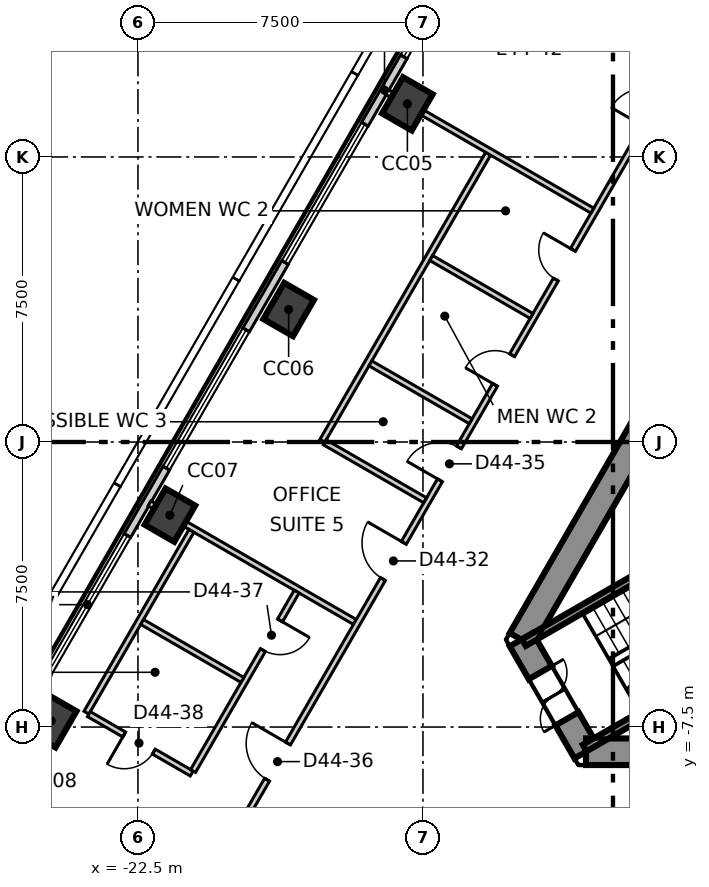
"""IFC4 building model, lengths in metres.
Left out: names, types, materials, properties, quantities, classifications, styles, units other than length and angle.
Written with IfcOpenShell. Run it as: python <this file> out.ifc"""

import sys

from ifc_helpers import new_model, si_unit, direction, frame, frame_2d, origin, origin_2d, place, context, subcontext, project, spatial, polyline, rectangle, outline, extrude, element, fill, save


model = new_model("IFC4")
c1 = context("Model", 3, precision=1e-05, world=origin(), true_north=direction((0.0, 1.0)))
c2 = subcontext(c1, "Body", "Model", "MODEL_VIEW")
j1 = project(units=[si_unit("LENGTHUNIT", "METRE"), si_unit("PLANEANGLEUNIT", "RADIAN")], contexts=[c1])
p1 = place(None, origin())
s1 = spatial("IfcSite", under=j1, at=p1, CompositionType="ELEMENT")
p2 = place(p1, origin())
s2 = spatial("IfcBuilding", under=s1, at=p2, CompositionType="ELEMENT")
p3 = place(p2, frame((0.0, 0.0, 191.3)))
s3 = spatial("IfcBuildingStorey", under=s2, at=p3, CompositionType="ELEMENT", Elevation=191.3)
p4 = place(p3, frame((-1.703, 13.35, -0.3), z_axis=(0.0, 0.0, 1.0), x_axis=(-0.500011533395, -0.866018744874, 0.0)))
e1 = element("IfcWall", 1, at=p4, inside=s3, PredefinedType="SHEAR", context=c2, shape_type="SweptSolid", body=[
    extrude(outline(polyline([(-0.202, -0.35), (1.782, -0.35), (3.766, -0.35), (5.75, -0.35), (7.734, -0.35), (9.718, -0.35), (11.702, -0.35), (13.686, -0.35), (15.67, -0.35), (17.654, -0.35), (19.638, -0.35), (21.622, -0.35), (21.218, 0.35), (19.307, 0.35), (17.397, 0.35), (15.486, 0.35), (13.576, 0.35), (11.665, 0.35), (9.755, 0.35), (7.844, 0.35), (5.934, 0.35), (4.023, 0.35), (2.113, 0.35), (0.202, 0.35), (-0.202, -0.35)])), origin(), (0.0, 0.0, 1.0), 4.0),
])
p5 = place(p4, frame((10.16, 0.0, 0.3)))
e2 = element("IfcOpeningElement", 2, at=p5, cuts=e1, PredefinedType="OPENING", context=c2, shape_type="SweptSolid", body=[
    extrude(rectangle(XDim=1.1, YDim=2.1, at=frame_2d((0.55, 1.05))), frame((0.0, 0.36, 0.0), z_axis=(0.0, -1.0, 0.0), x_axis=(1.0, 0.0, 0.0)), (0.0, 0.0, 1.0), 0.72),
])
p6 = place(p3, frame((-12.413, -5.2, -0.3), z_axis=(0.0, 0.0, 1.0), x_axis=(0.49999337185, -0.866029230515, 0.0)))
e3 = element("IfcWall", 3, at=p6, inside=s3, PredefinedType="SHEAR", context=c2, shape_type="SweptSolid", body=[
    extrude(outline(polyline([(-0.202, -0.35), (1.703, -0.35), (3.608, -0.35), (3.204, 0.35), (1.703, 0.35), (0.202, 0.35), (-0.202, -0.35)])), origin(), (0.0, 0.0, 1.0), 4.0),
])
p7 = place(p6, frame((1.003, 0.0, 0.3)))
e4 = element("IfcOpeningElement", 4, at=p7, cuts=e3, PredefinedType="OPENING", context=c2, shape_type="SweptSolid", body=[
    extrude(rectangle(XDim=1.4, YDim=2.1, at=frame_2d((0.7, 1.05))), frame((0.0, 0.36, 0.0), z_axis=(0.0, -1.0, 0.0), x_axis=(1.0, 0.0, 0.0)), (0.0, 0.0, 1.0), 0.72),
])
p8 = place(p3, frame((-10.71, -8.15, -0.3), z_axis=(0.0, 0.0, 1.0), x_axis=(1.0, 0.0, 0.0)))
e5 = element("IfcWall", 5, at=p8, inside=s3, PredefinedType="SHEAR", context=c2, shape_type="SweptSolid", body=[
    extrude(outline(polyline([(-0.202, -0.35), (1.782, -0.35), (3.766, -0.35), (5.75, -0.35), (7.734, -0.35), (9.718, -0.35), (11.702, -0.35), (13.686, -0.35), (15.67, -0.35), (17.654, -0.35), (19.638, -0.35), (21.622, -0.35), (21.218, 0.35), (19.307, 0.35), (17.397, 0.35), (15.486, 0.35), (13.576, 0.35), (11.665, 0.35), (9.755, 0.35), (7.844, 0.35), (5.934, 0.35), (4.023, 0.35), (2.113, 0.35), (0.202, 0.35), (-0.202, -0.35)])), origin(), (0.0, 0.0, 1.0), 4.0),
])
p9 = place(p8, frame((9.81, 0.0, 0.3)))
e6 = element("IfcOpeningElement", 6, at=p9, cuts=e5, PredefinedType="OPENING", context=c2, shape_type="SweptSolid", body=[
    extrude(rectangle(XDim=1.8, YDim=2.1, at=frame_2d((0.9, 1.05))), frame((0.0, 0.36, 0.0), z_axis=(0.0, -1.0, 0.0), x_axis=(1.0, 0.0, 0.0)), (0.0, 0.0, 1.0), 0.72),
])
p10 = place(p8, frame((4.09, 0.0, 0.3)))
e7 = element("IfcOpeningElement", 7, at=p10, cuts=e5, PredefinedType="OPENING", context=c2, shape_type="SweptSolid", body=[
    extrude(rectangle(XDim=1.0, YDim=2.1, at=frame_2d((0.5, 1.05))), frame((0.0, 0.36, 0.0), z_axis=(0.0, -1.0, 0.0), x_axis=(1.0, 0.0, 0.0)), (0.0, 0.0, 1.0), 0.72),
])
for number, where, z_axis, x_axis in (
    (8, (-15.41, 8.898, -0.3), (0.0, 0.0, 1.0), (0.5, 0.866, 0.0)),
    (9, (-18.535, 3.486, -0.3), (0.0, 0.0, 1.0), (0.5, 0.866, 0.0)),
    (10, (-21.659, -1.925, -0.3), (0.0, 0.0, 1.0), (0.5, 0.866, 0.0)),
    (11, (-24.783, -7.336, -0.3), (0.0, 0.0, 1.0), (0.5, 0.866, 0.0)),
):
    element("IfcColumn", number, at=place(p3, frame(where, z_axis=z_axis, x_axis=x_axis)), inside=s3, PredefinedType="COLUMN", context=c2, shape_type="SweptSolid", body=[
        extrude(rectangle(XDim=1.1, YDim=0.9, at=origin_2d()), origin(), (0.0, 0.0, 1.0), 4.0),
    ])
p11 = place(p3, frame((-2.869, 32.02, 0.0), z_axis=(0.0, 0.0, 1.0), x_axis=(-0.500006930241, -0.866021402571, 0.0)))
e12 = element("IfcWall", 12, at=p11, inside=s3, PredefinedType="ELEMENTEDWALL", context=c2, shape_type="SweptSolid", body=[
    extrude(rectangle(XDim=52.572, YDim=0.2, at=frame_2d((26.286, 0.0))), origin(), (0.0, 0.0, 1.0), 3.7),
])
p12 = place(p11, frame((2.327, 0.0, 0.9)))
e13 = element("IfcOpeningElement", 13, at=p12, cuts=e12, PredefinedType="OPENING", context=c2, shape_type="SweptSolid", body=[
    extrude(rectangle(XDim=4.2, YDim=2.5, at=frame_2d((2.1, 1.25))), frame((0.0, 0.11, 0.0), z_axis=(0.0, -1.0, 0.0), x_axis=(1.0, 0.0, 0.0)), (0.0, 0.0, 1.0), 0.22),
])
p13 = place(p11, frame((8.575, 0.0, 0.9)))
e14 = element("IfcOpeningElement", 14, at=p13, cuts=e12, PredefinedType="OPENING", context=c2, shape_type="SweptSolid", body=[
    extrude(rectangle(XDim=4.2, YDim=2.5, at=frame_2d((2.1, 1.25))), frame((0.0, 0.11, 0.0), z_axis=(0.0, -1.0, 0.0), x_axis=(1.0, 0.0, 0.0)), (0.0, 0.0, 1.0), 0.22),
])
p14 = place(p11, frame((14.823, 0.0, 0.9)))
e15 = element("IfcOpeningElement", 15, at=p14, cuts=e12, PredefinedType="OPENING", context=c2, shape_type="SweptSolid", body=[
    extrude(rectangle(XDim=4.2, YDim=2.5, at=frame_2d((2.1, 1.25))), frame((0.0, 0.11, 0.0), z_axis=(0.0, -1.0, 0.0), x_axis=(1.0, 0.0, 0.0)), (0.0, 0.0, 1.0), 0.22),
])
p15 = place(p11, frame((21.071, 0.0, 0.9)))
e16 = element("IfcOpeningElement", 16, at=p15, cuts=e12, PredefinedType="OPENING", context=c2, shape_type="SweptSolid", body=[
    extrude(rectangle(XDim=4.2, YDim=2.5, at=frame_2d((2.1, 1.25))), frame((0.0, 0.11, 0.0), z_axis=(0.0, -1.0, 0.0), x_axis=(1.0, 0.0, 0.0)), (0.0, 0.0, 1.0), 0.22),
])
p16 = place(p11, frame((27.319, 0.0, 0.9)))
e17 = element("IfcOpeningElement", 17, at=p16, cuts=e12, PredefinedType="OPENING", context=c2, shape_type="SweptSolid", body=[
    extrude(rectangle(XDim=4.2, YDim=2.5, at=frame_2d((2.1, 1.25))), frame((0.0, 0.11, 0.0), z_axis=(0.0, -1.0, 0.0), x_axis=(1.0, 0.0, 0.0)), (0.0, 0.0, 1.0), 0.22),
])
p17 = place(p11, frame((33.568, 0.0, 0.9)))
e18 = element("IfcOpeningElement", 18, at=p17, cuts=e12, PredefinedType="OPENING", context=c2, shape_type="SweptSolid", body=[
    extrude(rectangle(XDim=4.2, YDim=2.5, at=frame_2d((2.1, 1.25))), frame((0.0, 0.11, 0.0), z_axis=(0.0, -1.0, 0.0), x_axis=(1.0, 0.0, 0.0)), (0.0, 0.0, 1.0), 0.22),
])
p18 = place(p11, frame((39.816, 0.0, 0.9)))
e19 = element("IfcOpeningElement", 19, at=p18, cuts=e12, PredefinedType="OPENING", context=c2, shape_type="SweptSolid", body=[
    extrude(rectangle(XDim=4.2, YDim=2.5, at=frame_2d((2.1, 1.25))), frame((0.0, 0.11, 0.0), z_axis=(0.0, -1.0, 0.0), x_axis=(1.0, 0.0, 0.0)), (0.0, 0.0, 1.0), 0.22),
])
p19 = place(p11, frame((46.064, 0.0, 0.9)))
e20 = element("IfcOpeningElement", 20, at=p19, cuts=e12, PredefinedType="OPENING", context=c2, shape_type="SweptSolid", body=[
    extrude(rectangle(XDim=4.2, YDim=2.5, at=frame_2d((2.1, 1.25))), frame((0.0, 0.11, 0.0), z_axis=(0.0, -1.0, 0.0), x_axis=(1.0, 0.0, 0.0)), (0.0, 0.0, 1.0), 0.22),
])
p20 = place(p3, frame((-22.196, -1.615, 0.0), z_axis=(0.0, 0.0, 1.0), x_axis=(0.86601944389, -0.500010322698, 0.0)))
e21 = element("IfcWall", 21, at=p20, inside=s3, PredefinedType="PARTITIONING", context=c2, shape_type="SweptSolid", body=[
    extrude(rectangle(XDim=6.24, YDim=0.15, at=frame_2d((3.12, 0.0))), origin(), (0.0, 0.0, 1.0), 3.7),
])
p21 = place(p3, frame((-20.882, -11.969, 0.0), z_axis=(0.0, 0.0, 1.0), x_axis=(0.499998738735, 0.866026131975, 0.0)))
e22 = element("IfcWall", 22, at=p21, inside=s3, PredefinedType="PARTITIONING", context=c2, shape_type="SweptSolid", body=[
    extrude(rectangle(XDim=41.764, YDim=0.15, at=frame_2d((20.882, 0.0))), origin(), (0.0, 0.0, 1.0), 3.7),
])
p22 = place(p21, frame((37.014, 0.0, 0.0)))
e23 = element("IfcOpeningElement", 23, at=p22, cuts=e22, PredefinedType="OPENING", context=c2, shape_type="SweptSolid", body=[
    extrude(rectangle(XDim=1.0, YDim=2.1, at=frame_2d((0.5, 1.05))), frame((0.0, 0.085, 0.0), z_axis=(0.0, -1.0, 0.0), x_axis=(1.0, 0.0, 0.0)), (0.0, 0.0, 1.0), 0.17),
])
p23 = place(p21, frame((29.653, 0.0, 0.0)))
e24 = element("IfcOpeningElement", 24, at=p23, cuts=e22, PredefinedType="OPENING", context=c2, shape_type="SweptSolid", body=[
    extrude(rectangle(XDim=1.0, YDim=2.1, at=frame_2d((0.5, 1.05))), frame((0.0, 0.085, 0.0), z_axis=(0.0, -1.0, 0.0), x_axis=(1.0, 0.0, 0.0)), (0.0, 0.0, 1.0), 0.17),
])
p24 = place(p21, frame((23.405, 0.0, 0.0)))
e25 = element("IfcOpeningElement", 25, at=p24, cuts=e22, PredefinedType="OPENING", context=c2, shape_type="SweptSolid", body=[
    extrude(rectangle(XDim=1.0, YDim=2.1, at=frame_2d((0.5, 1.05))), frame((0.0, 0.085, 0.0), z_axis=(0.0, -1.0, 0.0), x_axis=(1.0, 0.0, 0.0)), (0.0, 0.0, 1.0), 0.17),
])
p25 = place(p21, frame((9.657, 0.0, 0.0)))
e26 = element("IfcOpeningElement", 26, at=p25, cuts=e22, PredefinedType="OPENING", context=c2, shape_type="SweptSolid", body=[
    extrude(rectangle(XDim=1.1, YDim=2.1, at=frame_2d((0.55, 1.05))), frame((0.0, 0.085, 0.0), z_axis=(0.0, -1.0, 0.0), x_axis=(1.0, 0.0, 0.0)), (0.0, 0.0, 1.0), 0.17),
])
p26 = place(p21, frame((18.757, 0.0, 0.0)))
e27 = element("IfcOpeningElement", 27, at=p26, cuts=e22, PredefinedType="OPENING", context=c2, shape_type="SweptSolid", body=[
    extrude(rectangle(XDim=0.9, YDim=2.1, at=frame_2d((0.45, 1.05))), frame((0.0, 0.085, 0.0), z_axis=(0.0, -1.0, 0.0), x_axis=(1.0, 0.0, 0.0)), (0.0, 0.0, 1.0), 0.17),
])
p27 = place(p21, frame((15.557, 0.0, 0.0)))
e28 = element("IfcOpeningElement", 28, at=p27, cuts=e22, PredefinedType="OPENING", context=c2, shape_type="SweptSolid", body=[
    extrude(rectangle(XDim=0.9, YDim=2.1, at=frame_2d((0.45, 1.05))), frame((0.0, 0.085, 0.0), z_axis=(0.0, -1.0, 0.0), x_axis=(1.0, 0.0, 0.0)), (0.0, 0.0, 1.0), 0.17),
])
p28 = place(p21, frame((12.657, 0.0, 0.0)))
e29 = element("IfcOpeningElement", 29, at=p28, cuts=e22, PredefinedType="OPENING", context=c2, shape_type="SweptSolid", body=[
    extrude(rectangle(XDim=1.0, YDim=2.1, at=frame_2d((0.5, 1.05))), frame((0.0, 0.085, 0.0), z_axis=(0.0, -1.0, 0.0), x_axis=(1.0, 0.0, 0.0)), (0.0, 0.0, 1.0), 0.17),
])
p29 = place(p21, frame((3.56, 0.0, 0.0)))
e30 = element("IfcOpeningElement", 30, at=p29, cuts=e22, PredefinedType="OPENING", context=c2, shape_type="SweptSolid", body=[
    extrude(rectangle(XDim=1.1, YDim=2.1, at=frame_2d((0.55, 1.05))), frame((0.0, 0.085, 0.0), z_axis=(0.0, -1.0, 0.0), x_axis=(1.0, 0.0, 0.0)), (0.0, 0.0, 1.0), 0.17),
])
p30 = place(p3, frame((-17.648, 0.029, 0.0), z_axis=(0.0, 0.0, 1.0), x_axis=(0.500054279689, 0.865994063124, 0.0)))
e31 = element("IfcWall", 31, at=p30, inside=s3, PredefinedType="PARTITIONING", context=c2, shape_type="SweptSolid", body=[
    extrude(rectangle(XDim=8.725, YDim=0.15, at=frame_2d((4.363, 0.0))), origin(), (0.0, 0.0, 1.0), 3.7),
])
for number, where, z_axis, x_axis in (
    (32, (-17.583, -0.009, 0.0), (0.0, 0.0, 1.0), (0.866, -0.5, 0.0)),
    (33, (-16.383, 2.069, 0.0), (0.0, 0.0, 1.0), (0.866, -0.5, 0.0)),
):
    element("IfcWall", number, at=place(p3, frame(where, z_axis=z_axis, x_axis=x_axis)), inside=s3, PredefinedType="PARTITIONING", context=c2, shape_type="SweptSolid", body=[
        extrude(rectangle(XDim=3.048, YDim=0.15, at=frame_2d((1.524, 0.0))), origin(), (0.0, 0.0, 1.0), 3.7),
    ])
p31 = place(p3, frame((-15.947, 9.208, 0.0), z_axis=(0.0, 0.0, 1.0), x_axis=(0.86601944389, -0.500010322698, 0.0)))
e34 = element("IfcWall", 34, at=p31, inside=s3, PredefinedType="PARTITIONING", context=c2, shape_type="SweptSolid", body=[
    extrude(rectangle(XDim=6.24, YDim=0.15, at=frame_2d((3.12, 0.0))), origin(), (0.0, 0.0, 1.0), 3.2),
])
p32 = place(p3, frame((-14.783, 4.841, 0.0), z_axis=(0.0, 0.0, 1.0), x_axis=(0.866021535541, -0.500006699934, 0.0)))
e35 = element("IfcWall", 35, at=p32, inside=s3, PredefinedType="PARTITIONING", context=c2, shape_type="SweptSolid", body=[
    extrude(rectangle(XDim=3.048, YDim=0.15, at=frame_2d((1.524, 0.0))), origin(), (0.0, 0.0, 1.0), 3.7),
])
p33 = place(p3, frame((-23.855, -7.123, 0.0), z_axis=(0.0, 0.0, 1.0), x_axis=(0.499994082372, 0.866028820302, 0.0)))
e36 = element("IfcWall", 36, at=p33, inside=s3, PredefinedType="PARTITIONING", context=c2, shape_type="SweptSolid", body=[
    extrude(rectangle(XDim=5.524, YDim=0.15, at=frame_2d((2.762, 0.0))), origin(), (0.0, 0.0, 1.0), 3.7),
])
p34 = place(p3, frame((-23.79, -7.161, 0.0), z_axis=(0.0, 0.0, 1.0), x_axis=(0.866050172578, -0.499957096737, 0.0)))
e37 = element("IfcWall", 37, at=p34, inside=s3, PredefinedType="PARTITIONING", context=c2, shape_type="SweptSolid", body=[
    extrude(rectangle(XDim=3.122, YDim=0.15, at=frame_2d((1.561, 0.0))), origin(), (0.0, 0.0, 1.0), 3.7),
])
p35 = place(p34, frame((1.072, 0.0, 0.0)))
e38 = element("IfcOpeningElement", 38, at=p35, cuts=e37, PredefinedType="OPENING", context=c2, shape_type="SweptSolid", body=[
    extrude(rectangle(XDim=0.9, YDim=2.1, at=frame_2d((0.45, 1.05))), frame((0.0, 0.085, 0.0), z_axis=(0.0, -1.0, 0.0), x_axis=(1.0, 0.0, 0.0)), (0.0, 0.0, 1.0), 0.17),
])
p36 = place(p3, frame((-21.049, -8.657, 0.0), z_axis=(0.0, 0.0, 1.0), x_axis=(0.500002931134, 0.866023711487, 0.0)))
e39 = element("IfcWall", 39, at=p36, inside=s3, PredefinedType="PARTITIONING", context=c2, shape_type="SweptSolid", body=[
    extrude(rectangle(XDim=5.45, YDim=0.15, at=frame_2d((2.725, 0.0))), origin(), (0.0, 0.0, 1.0), 3.7),
])
p37 = place(p36, frame((3.675, 0.0, 0.0)))
e40 = element("IfcOpeningElement", 40, at=p37, cuts=e39, PredefinedType="OPENING", context=c2, shape_type="SweptSolid", body=[
    extrude(rectangle(XDim=0.9, YDim=2.1, at=frame_2d((0.45, 1.05))), frame((0.0, 0.085, 0.0), z_axis=(0.0, -1.0, 0.0), x_axis=(1.0, 0.0, 0.0)), (0.0, 0.0, 1.0), 0.17),
])
p38 = place(p3, frame((-22.39, -4.736, 0.0), z_axis=(0.0, 0.0, 1.0), x_axis=(0.865976105257, -0.500085377835, 0.0)))
e41 = element("IfcWall", 41, at=p38, inside=s3, PredefinedType="PARTITIONING", context=c2, shape_type="SweptSolid", body=[
    extrude(rectangle(XDim=3.047, YDim=0.15, at=frame_2d((1.524, 0.0))), origin(), (0.0, 0.0, 1.0), 3.7),
])
p39 = place(p3, frame((-12.344, -5.279, 0.0), z_axis=(0.0, 0.0, 1.0), x_axis=(0.866046323291, 0.499963764601, 0.0)))
e42 = element("IfcWall", 42, at=p39, inside=s3, PredefinedType="SOLIDWALL", context=c2, shape_type="SweptSolid", body=[
    extrude(rectangle(XDim=6.714, YDim=0.2, at=frame_2d((3.357, 0.0))), origin(), (0.0, 0.0, 1.0), 3.7),
])
p40 = place(p3, frame((-10.744, -8.051, 0.0), z_axis=(0.0, 0.0, 1.0), x_axis=(0.865983344943, 0.500072840975, 0.0)))
e43 = element("IfcWall", 43, at=p40, inside=s3, PredefinedType="SOLIDWALL", context=c2, shape_type="SweptSolid", body=[
    extrude(rectangle(XDim=6.715, YDim=0.2, at=frame_2d((3.357, 0.0))), origin(), (0.0, 0.0, 1.0), 3.7),
])
p41 = place(p15, origin())
e44 = element("IfcWindow", 44, at=p41, inside=s3, PartitioningType="SINGLE_PANEL", PredefinedType="WINDOW", context=c2, shape_type="SweptSolid", body=[
    extrude(rectangle(XDim=4.2, YDim=2.5, at=frame_2d((2.1, 1.25))), frame((0.0, 0.03, 0.0), z_axis=(0.0, -1.0, 0.0), x_axis=(1.0, 0.0, 0.0)), (0.0, 0.0, 1.0), 0.06),
])
fill(e16, e44)
p42 = place(p16, origin())
e45 = element("IfcWindow", 45, at=p42, inside=s3, PartitioningType="SINGLE_PANEL", PredefinedType="WINDOW", context=c2, shape_type="SweptSolid", body=[
    extrude(rectangle(XDim=4.2, YDim=2.5, at=frame_2d((2.1, 1.25))), frame((0.0, 0.03, 0.0), z_axis=(0.0, -1.0, 0.0), x_axis=(1.0, 0.0, 0.0)), (0.0, 0.0, 1.0), 0.06),
])
fill(e17, e45)
p43 = place(p17, origin())
e46 = element("IfcWindow", 46, at=p43, inside=s3, PartitioningType="SINGLE_PANEL", PredefinedType="WINDOW", context=c2, shape_type="SweptSolid", body=[
    extrude(rectangle(XDim=4.2, YDim=2.5, at=frame_2d((2.1, 1.25))), frame((0.0, 0.03, 0.0), z_axis=(0.0, -1.0, 0.0), x_axis=(1.0, 0.0, 0.0)), (0.0, 0.0, 1.0), 0.06),
])
fill(e18, e46)
p44 = place(p18, origin())
e47 = element("IfcWindow", 47, at=p44, inside=s3, PartitioningType="SINGLE_PANEL", PredefinedType="WINDOW", context=c2, shape_type="SweptSolid", body=[
    extrude(rectangle(XDim=4.2, YDim=2.5, at=frame_2d((2.1, 1.25))), frame((0.0, 0.03, 0.0), z_axis=(0.0, -1.0, 0.0), x_axis=(1.0, 0.0, 0.0)), (0.0, 0.0, 1.0), 0.06),
])
fill(e19, e47)
p45 = place(p25, origin())
e48 = element("IfcDoor", 48, at=p45, inside=s3, OperationType="SINGLE_SWING_LEFT", PredefinedType="DOOR", context=c2, shape_type="SweptSolid", body=[
    extrude(rectangle(XDim=1.1, YDim=2.1, at=frame_2d((0.55, 1.05))), frame((0.0, 0.025, 0.0), z_axis=(0.0, -1.0, 0.0), x_axis=(1.0, 0.0, 0.0)), (0.0, 0.0, 1.0), 0.05),
])
fill(e26, e48)
p46 = place(p26, origin())
e49 = element("IfcDoor", 49, at=p46, inside=s3, OperationType="SINGLE_SWING_LEFT", PredefinedType="DOOR", context=c2, shape_type="SweptSolid", body=[
    extrude(rectangle(XDim=0.9, YDim=2.1, at=frame_2d((0.45, 1.05))), frame((0.0, 0.025, 0.0), z_axis=(0.0, -1.0, 0.0), x_axis=(1.0, 0.0, 0.0)), (0.0, 0.0, 1.0), 0.05),
])
fill(e27, e49)
p47 = place(p27, origin())
e50 = element("IfcDoor", 50, at=p47, inside=s3, OperationType="SINGLE_SWING_RIGHT", PredefinedType="DOOR", context=c2, shape_type="SweptSolid", body=[
    extrude(rectangle(XDim=0.9, YDim=2.1, at=frame_2d((0.45, 1.05))), frame((0.0, 0.025, 0.0), z_axis=(0.0, -1.0, 0.0), x_axis=(1.0, 0.0, 0.0)), (0.0, 0.0, 1.0), 0.05),
])
fill(e28, e50)
p48 = place(p28, origin())
e51 = element("IfcDoor", 51, at=p48, inside=s3, OperationType="SINGLE_SWING_RIGHT", PredefinedType="DOOR", context=c2, shape_type="SweptSolid", body=[
    extrude(rectangle(XDim=1.0, YDim=2.1, at=frame_2d((0.5, 1.05))), frame((0.0, 0.025, 0.0), z_axis=(0.0, -1.0, 0.0), x_axis=(1.0, 0.0, 0.0)), (0.0, 0.0, 1.0), 0.05),
])
fill(e29, e51)
p49 = place(p29, origin())
e52 = element("IfcDoor", 52, at=p49, inside=s3, OperationType="SINGLE_SWING_LEFT", PredefinedType="DOOR", context=c2, shape_type="SweptSolid", body=[
    extrude(rectangle(XDim=1.1, YDim=2.1, at=frame_2d((0.55, 1.05))), frame((0.0, 0.025, 0.0), z_axis=(0.0, -1.0, 0.0), x_axis=(1.0, 0.0, 0.0)), (0.0, 0.0, 1.0), 0.05),
])
fill(e30, e52)
p50 = place(p37, origin())
e53 = element("IfcDoor", 53, at=p50, inside=s3, OperationType="SINGLE_SWING_RIGHT", PredefinedType="DOOR", context=c2, shape_type="SweptSolid", body=[
    extrude(rectangle(XDim=0.9, YDim=2.1, at=frame_2d((0.45, 1.05))), frame((0.0, 0.025, 0.0), z_axis=(0.0, -1.0, 0.0), x_axis=(1.0, 0.0, 0.0)), (0.0, 0.0, 1.0), 0.05),
])
fill(e40, e53)
p51 = place(p35, origin())
e54 = element("IfcDoor", 54, at=p51, inside=s3, OperationType="SINGLE_SWING_LEFT", PredefinedType="DOOR", context=c2, shape_type="SweptSolid", body=[
    extrude(rectangle(XDim=0.9, YDim=2.1, at=frame_2d((0.45, 1.05))), frame((0.0, 0.025, 0.0), z_axis=(0.0, -1.0, 0.0), x_axis=(1.0, 0.0, 0.0)), (0.0, 0.0, 1.0), 0.05),
])
fill(e38, e54)
p52 = place(p7, origin())
e55 = element("IfcDoor", 55, at=p52, inside=s3, OperationType="DOUBLE_DOOR_SINGLE_SWING", PredefinedType="DOOR", context=c2, shape_type="SweptSolid", body=[
    extrude(rectangle(XDim=1.4, YDim=2.1, at=frame_2d((0.7, 1.05))), frame((0.0, 0.025, 0.0), z_axis=(0.0, -1.0, 0.0), x_axis=(1.0, 0.0, 0.0)), (0.0, 0.0, 1.0), 0.05),
])
fill(e4, e55)
save(model, sys.argv[1])
